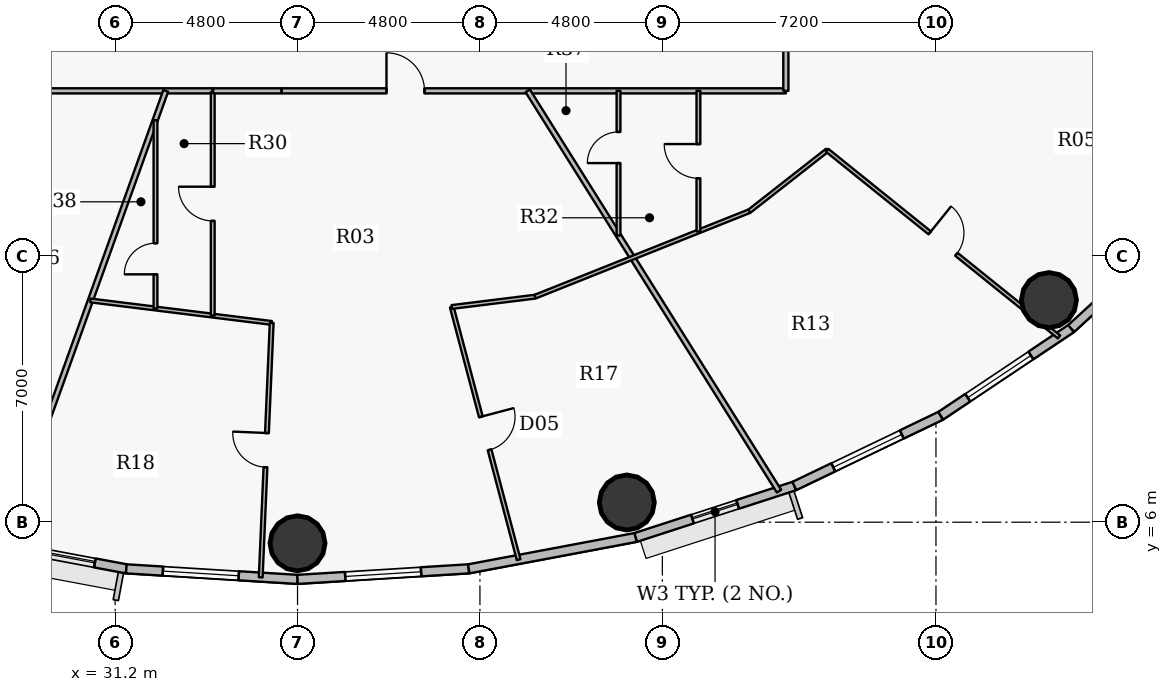
"""IFC4 building model, lengths in metres.
Left out: names, types, materials, properties, quantities, classifications, styles, units other than length and angle.
Written with IfcOpenShell. Run it as: python <this file> out.ifc"""

import sys

from ifc_helpers import new_model, si_unit, direction, frame, frame_2d, origin, origin_2d, place, context, subcontext, project, spatial, rectangle, hollow_circle, extrude, source, transform, mapped, element, fill, save


model = new_model("IFC4")
c1 = context("Model", 3, precision=1e-05, world=origin(), true_north=direction((0.0, 1.0)))
c2 = subcontext(c1, "Body", "Model", "MODEL_VIEW")
j1 = project(units=[si_unit("LENGTHUNIT", "METRE"), si_unit("PLANEANGLEUNIT", "RADIAN")], contexts=[c1])
p1 = place(None, origin())
s1 = spatial("IfcSite", under=j1, at=p1, CompositionType="ELEMENT")
p2 = place(p1, origin())
s2 = spatial("IfcBuilding", under=s1, at=p2, CompositionType="ELEMENT")
p3 = place(p2, frame((0.0, 0.0, 119.7)))
s3 = spatial("IfcBuildingStorey", under=s2, at=p3, CompositionType="ELEMENT", Elevation=119.7)
for number, where, z_axis, x_axis in (
    (1, (36.0, 5.445, 0.0), (0.0, 0.0, 1.0), (1.0, 0.0, 0.0)),
    (2, (44.666, 6.519, 0.0), (0.0, 0.0, 1.0), (1.0, 0.0, 0.0)),
    (3, (55.773, 11.844, 0.0), (0.0, 0.0, 1.0), (1.0, 0.0, 0.0)),
):
    element("IfcColumn", number, at=place(p3, frame(where, z_axis=z_axis, x_axis=x_axis)), inside=s3, PredefinedType="COLUMN", context=c2, shape_type="SweptSolid", body=[
        extrude(hollow_circle(Radius=0.725, WallThickness=0.042, at=origin_2d()), origin(), (0.0, 0.0, 1.0), 3.75),
    ])
p4 = place(p3, frame((31.494, 4.773, 0.0), z_axis=(0.0, 0.0, 1.0), x_axis=(-0.982789252177, 0.184730305596, 0.0)))
e4 = element("IfcWall", 4, at=p4, inside=s3, PredefinedType="SOLIDWALL", context=c2, shape_type="SweptSolid", body=[
    extrude(rectangle(XDim=4.471, YDim=0.24, at=frame_2d((2.235, 0.0))), origin(), (0.0, 0.0, 1.0), 3.5),
])
p5 = place(p4, frame((0.843, 0.0, 0.9)))
e5 = element("IfcOpeningElement", 5, at=p5, cuts=e4, PredefinedType="OPENING", context=c2, shape_type="SweptSolid", body=[
    extrude(rectangle(XDim=2.0, YDim=1.75, at=origin_2d()), frame((1.0, 0.13, 0.875), z_axis=(0.0, -1.0, 0.0), x_axis=(1.0, 0.0, 0.0)), (0.0, 0.0, 1.0), 0.26),
])
p6 = place(p3, frame((36.0, 4.495, 0.0), z_axis=(0.0, 0.0, 1.0), x_axis=(-0.998107531589, 0.061492726276, 0.0)))
e6 = element("IfcWall", 6, at=p6, inside=s3, PredefinedType="SOLIDWALL", context=c2, shape_type="SweptSolid", body=[
    extrude(rectangle(XDim=4.514, YDim=0.24, at=frame_2d((2.257, 0.0))), origin(), (0.0, 0.0, 1.0), 3.5),
])
p7 = place(p6, frame((1.55, 0.0, 0.9)))
e7 = element("IfcOpeningElement", 7, at=p7, cuts=e6, PredefinedType="OPENING", context=c2, shape_type="SweptSolid", body=[
    extrude(rectangle(XDim=2.0, YDim=1.75, at=origin_2d()), frame((1.0, 0.13, 0.875), z_axis=(0.0, -1.0, 0.0), x_axis=(1.0, 0.0, 0.0)), (0.0, 0.0, 1.0), 0.26),
])
p8 = place(p3, frame((40.506, 4.773, 0.0), z_axis=(0.0, 0.0, 1.0), x_axis=(-0.998107531589, -0.061492726276, 0.0)))
e8 = element("IfcWall", 8, at=p8, inside=s3, PredefinedType="SOLIDWALL", context=c2, shape_type="SweptSolid", body=[
    extrude(rectangle(XDim=4.514, YDim=0.24, at=frame_2d((2.257, 0.0))), origin(), (0.0, 0.0, 1.0), 3.5),
])
p9 = place(p8, frame((1.257, 0.0, 0.9)))
e9 = element("IfcOpeningElement", 9, at=p9, cuts=e8, PredefinedType="OPENING", context=c2, shape_type="SweptSolid", body=[
    extrude(rectangle(XDim=2.0, YDim=1.75, at=origin_2d()), frame((1.0, 0.13, 0.875), z_axis=(0.0, -1.0, 0.0), x_axis=(1.0, 0.0, 0.0)), (0.0, 0.0, 1.0), 0.26),
])
p10 = place(p3, frame((44.9, 5.599, 0.0), z_axis=(0.0, 0.0, 1.0), x_axis=(-0.982789252177, -0.184730305596, 0.0)))
e10 = element("IfcWall", 10, at=p10, inside=s3, PredefinedType="SOLIDWALL", context=c2, shape_type="SweptSolid", body=[
    extrude(rectangle(XDim=4.471, YDim=0.24, at=frame_2d((2.235, 0.0))), origin(), (0.0, 0.0, 1.0), 3.5),
])
p11 = place(p3, frame((49.074, 6.953, 0.0), z_axis=(0.0, 0.0, 1.0), x_axis=(-0.951211346073, -0.308540070495, 0.0)))
e11 = element("IfcWall", 11, at=p11, inside=s3, PredefinedType="SOLIDWALL", context=c2, shape_type="SweptSolid", body=[
    extrude(rectangle(XDim=4.388, YDim=0.24, at=frame_2d((2.194, 0.0))), origin(), (0.0, 0.0, 1.0), 3.5),
])
p12 = place(p11, frame((1.569, 0.0, 0.9)))
e12 = element("IfcOpeningElement", 12, at=p12, cuts=e11, PredefinedType="OPENING", context=c2, shape_type="SweptSolid", body=[
    extrude(rectangle(XDim=1.25, YDim=1.65, at=origin_2d()), frame((0.625, 0.13, 0.825), z_axis=(0.0, -1.0, 0.0), x_axis=(1.0, 0.0, 0.0)), (0.0, 0.0, 1.0), 0.26),
])
p13 = place(p3, frame((52.925, 8.801, 0.0), z_axis=(0.0, 0.0, 1.0), x_axis=(-0.901589935876, -0.432591709962, 0.0)))
e13 = element("IfcWall", 13, at=p13, inside=s3, PredefinedType="SOLIDWALL", context=c2, shape_type="SweptSolid", body=[
    extrude(rectangle(XDim=4.272, YDim=0.24, at=frame_2d((2.136, 0.0))), origin(), (0.0, 0.0, 1.0), 3.5),
])
p14 = place(p13, frame((1.136, 0.0, 0.9)))
e14 = element("IfcOpeningElement", 14, at=p14, cuts=e13, PredefinedType="OPENING", context=c2, shape_type="SweptSolid", body=[
    extrude(rectangle(XDim=2.0, YDim=1.75, at=origin_2d()), frame((1.0, 0.13, 0.875), z_axis=(0.0, -1.0, 0.0), x_axis=(1.0, 0.0, 0.0)), (0.0, 0.0, 1.0), 0.26),
])
p15 = place(p3, frame((56.358, 11.097, 0.0), z_axis=(0.0, 0.0, 1.0), x_axis=(-0.831221811447, -0.555940914284, 0.0)))
e15 = element("IfcWall", 15, at=p15, inside=s3, PredefinedType="SOLIDWALL", context=c2, shape_type="SweptSolid", body=[
    extrude(rectangle(XDim=4.13, YDim=0.24, at=frame_2d((2.065, 0.0))), origin(), (0.0, 0.0, 1.0), 3.5),
])
p16 = place(p15, frame((1.276, 0.0, 0.9)))
e16 = element("IfcOpeningElement", 16, at=p16, cuts=e15, PredefinedType="OPENING", context=c2, shape_type="SweptSolid", body=[
    extrude(rectangle(XDim=2.0, YDim=1.75, at=origin_2d()), frame((1.0, 0.13, 0.875), z_axis=(0.0, -1.0, 0.0), x_axis=(1.0, 0.0, 0.0)), (0.0, 0.0, 1.0), 0.26),
])
p17 = place(p3, frame((59.289, 13.783, 0.0), z_axis=(0.0, 0.0, 1.0), x_axis=(-0.737113356241, -0.675769117414, 0.0)))
e17 = element("IfcWall", 17, at=p17, inside=s3, PredefinedType="SOLIDWALL", context=c2, shape_type="SweptSolid", body=[
    extrude(rectangle(XDim=3.976, YDim=0.24, at=frame_2d((1.988, 0.0))), origin(), (0.0, 0.0, 1.0), 3.5),
])
p18 = place(p17, frame((1.363, 0.0, 0.9)))
e18 = element("IfcOpeningElement", 18, at=p18, cuts=e17, PredefinedType="OPENING", context=c2, shape_type="SweptSolid", body=[
    extrude(rectangle(XDim=1.25, YDim=1.65, at=origin_2d()), frame((0.625, 0.13, 0.825), z_axis=(0.0, -1.0, 0.0), x_axis=(1.0, 0.0, 0.0)), (0.0, 0.0, 1.0), 0.26),
])
p19 = place(p3, frame((23.15, 17.35, 0.0), z_axis=(0.0, 0.0, 1.0), x_axis=(1.0, 0.0, 0.0)))
e19 = element("IfcWall", 19, at=p19, inside=s3, PredefinedType="PARTITIONING", context=c2, shape_type="SweptSolid", body=[
    extrude(rectangle(XDim=10.619, YDim=0.135, at=frame_2d((5.31, 0.0))), origin(), (0.0, 0.0, 1.0), 2.935),
])
p20 = place(p19, frame((4.211, 0.0, 0.0)))
e20 = element("IfcOpeningElement", 20, at=p20, cuts=e19, PredefinedType="OPENING", context=c2, shape_type="SweptSolid", body=[
    extrude(rectangle(XDim=1.0, YDim=2.15, at=origin_2d()), frame((0.5, 0.078, 1.075), z_axis=(0.0, -1.0, 0.0), x_axis=(1.0, 0.0, 0.0)), (0.0, 0.0, 1.0), 0.155),
])
p21 = place(p3, frame((28.232, 5.381, 0.0), z_axis=(0.0, 0.0, 1.0), x_axis=(0.338158615332, 0.941089130145, 0.0)))
e21 = element("IfcWall", 21, at=p21, inside=s3, PredefinedType="PARTITIONING", context=c2, shape_type="SweptSolid", body=[
    extrude(rectangle(XDim=12.718, YDim=0.135, at=frame_2d((6.359, 0.0))), origin(), (0.0, 0.0, 1.0), 2.935),
])
p22 = place(p3, frame((30.551, 11.835, 0.0), z_axis=(0.0, 0.0, 1.0), x_axis=(0.992401646286, -0.123040531728, 0.0)))
e22 = element("IfcWall", 22, at=p22, inside=s3, PredefinedType="PARTITIONING", context=c2, shape_type="SweptSolid", body=[
    extrude(rectangle(XDim=4.806, YDim=0.1, at=frame_2d((2.403, 0.0))), origin(), (0.0, 0.0, 1.0), 3.5),
])
p23 = place(p3, frame((32.262, 11.623, 0.0), z_axis=(0.0, 0.0, 1.0), x_axis=(0.0, 1.0, 0.0)))
e23 = element("IfcWall", 23, at=p23, inside=s3, PredefinedType="PARTITIONING", context=c2, shape_type="SweptSolid", body=[
    extrude(rectangle(XDim=4.955, YDim=0.1, at=frame_2d((2.478, 0.0))), origin(), (0.0, 0.0, 1.0), 3.5),
])
p24 = place(p23, frame((0.899, 0.0, 0.0)))
e24 = element("IfcOpeningElement", 24, at=p24, cuts=e23, PredefinedType="OPENING", context=c2, shape_type="SweptSolid", body=[
    extrude(rectangle(XDim=0.82, YDim=2.1, at=origin_2d()), frame((0.41, 0.06, 1.05), z_axis=(0.0, -1.0, 0.0), x_axis=(1.0, 0.0, 0.0)), (0.0, 0.0, 1.0), 0.12),
])
p25 = place(p3, frame((33.769, 11.436, 0.0), z_axis=(0.0, 0.0, 1.0), x_axis=(0.0, 1.0, 0.0)))
e25 = element("IfcWall", 25, at=p25, inside=s3, PredefinedType="PARTITIONING", context=c2, shape_type="SweptSolid", body=[
    extrude(rectangle(XDim=5.884, YDim=0.1, at=frame_2d((2.942, 0.0))), origin(), (0.0, 0.0, 1.0), 3.5),
])
p26 = place(p25, frame((2.492, 0.0, 0.0)))
e26 = element("IfcOpeningElement", 26, at=p26, cuts=e25, PredefinedType="OPENING", context=c2, shape_type="SweptSolid", body=[
    extrude(rectangle(XDim=0.9, YDim=2.1, at=origin_2d()), frame((0.45, 0.06, 1.05), z_axis=(0.0, -1.0, 0.0), x_axis=(1.0, 0.0, 0.0)), (0.0, 0.0, 1.0), 0.12),
])
p27 = place(p3, frame((35.031, 4.55, 0.0), z_axis=(0.0, 0.0, 1.0), x_axis=(0.043108301027, 0.999070405118, 0.0)))
e27 = element("IfcWall", 27, at=p27, inside=s3, PredefinedType="PARTITIONING", context=c2, shape_type="SweptSolid", body=[
    extrude(rectangle(XDim=6.7, YDim=0.1, at=frame_2d((3.35, 0.0))), origin(), (0.0, 0.0, 1.0), 2.935),
])
p28 = place(p27, frame((2.9, 0.0, 0.0)))
e28 = element("IfcOpeningElement", 28, at=p28, cuts=e27, PredefinedType="OPENING", context=c2, shape_type="SweptSolid", body=[
    extrude(rectangle(XDim=0.9, YDim=2.1, at=origin_2d()), frame((0.45, 0.06, 1.05), z_axis=(0.0, -1.0, 0.0), x_axis=(1.0, 0.0, 0.0)), (0.0, 0.0, 1.0), 0.12),
])
p29 = place(p3, frame((35.584, 17.35, 0.0), z_axis=(0.0, 0.0, 1.0), x_axis=(1.0, 0.0, 0.0)))
e29 = element("IfcWall", 29, at=p29, inside=s3, PredefinedType="PARTITIONING", context=c2, shape_type="SweptSolid", body=[
    extrude(rectangle(XDim=13.266, YDim=0.135, at=frame_2d((6.633, 0.0))), origin(), (0.0, 0.0, 1.0), 2.935),
])
p30 = place(p29, frame((2.757, 0.0, 0.0)))
e30 = element("IfcOpeningElement", 30, at=p30, cuts=e29, PredefinedType="OPENING", context=c2, shape_type="SweptSolid", body=[
    extrude(rectangle(XDim=1.0, YDim=2.15, at=origin_2d()), frame((0.5, 0.078, 1.075), z_axis=(0.0, -1.0, 0.0), x_axis=(1.0, 0.0, 0.0)), (0.0, 0.0, 1.0), 0.155),
])
p31 = place(p3, frame((40.059, 11.662, 0.0), z_axis=(0.0, 0.0, 1.0), x_axis=(0.255861334688, -0.966713492929, 0.0)))
e31 = element("IfcWall", 31, at=p31, inside=s3, PredefinedType="PARTITIONING", context=c2, shape_type="SweptSolid", body=[
    extrude(rectangle(XDim=6.877, YDim=0.1, at=frame_2d((3.438, 0.0))), origin(), (0.0, 0.0, 1.0), 2.935),
])
p32 = place(p31, frame((2.988, 0.0, 0.0)))
e32 = element("IfcOpeningElement", 32, at=p32, cuts=e31, PredefinedType="OPENING", context=c2, shape_type="SweptSolid", body=[
    extrude(rectangle(XDim=0.9, YDim=2.1, at=origin_2d()), frame((0.45, 0.06, 1.05), z_axis=(0.0, -1.0, 0.0), x_axis=(1.0, 0.0, 0.0)), (0.0, 0.0, 1.0), 0.12),
])
p33 = place(p3, frame((40.059, 11.662, 0.0), z_axis=(0.0, 0.0, 1.0), x_axis=(0.992393057675, 0.12310978466, 0.0)))
e33 = element("IfcWall", 33, at=p33, inside=s3, PredefinedType="PARTITIONING", context=c2, shape_type="SweptSolid", body=[
    extrude(rectangle(XDim=2.209, YDim=0.1, at=frame_2d((1.104, 0.0))), origin(), (0.0, 0.0, 1.0), 2.935),
])
p34 = place(p3, frame((42.058, 17.35, 0.0), z_axis=(0.0, 0.0, 1.0), x_axis=(0.531660079213, -0.846957826678, 0.0)))
e34 = element("IfcWall", 34, at=p34, inside=s3, PredefinedType="PARTITIONING", context=c2, shape_type="SweptSolid", body=[
    extrude(rectangle(XDim=12.437, YDim=0.135, at=frame_2d((6.219, 0.0))), origin(), (0.0, 0.0, 1.0), 2.935),
])
p35 = place(p3, frame((42.251, 11.934, 0.0), z_axis=(0.0, 0.0, 1.0), x_axis=(0.928803554156, 0.370572473055, 0.0)))
e35 = element("IfcWall", 35, at=p35, inside=s3, PredefinedType="PARTITIONING", context=c2, shape_type="SweptSolid", body=[
    extrude(rectangle(XDim=6.072, YDim=0.1, at=frame_2d((3.036, 0.0))), origin(), (0.0, 0.0, 1.0), 2.935),
])
p36 = place(p3, frame((44.447, 13.544, 0.0), z_axis=(0.0, 0.0, 1.0), x_axis=(0.0, 1.0, 0.0)))
e36 = element("IfcWall", 36, at=p36, inside=s3, PredefinedType="PARTITIONING", context=c2, shape_type="SweptSolid", body=[
    extrude(rectangle(XDim=3.806, YDim=0.1, at=frame_2d((1.903, 0.0))), origin(), (0.0, 0.0, 1.0), 3.5),
])
p37 = place(p36, frame((1.905, 0.0, 0.0)))
e37 = element("IfcOpeningElement", 37, at=p37, cuts=e36, PredefinedType="OPENING", context=c2, shape_type="SweptSolid", body=[
    extrude(rectangle(XDim=0.82, YDim=2.1, at=origin_2d()), frame((0.41, 0.06, 1.05), z_axis=(0.0, -1.0, 0.0), x_axis=(1.0, 0.0, 0.0)), (0.0, 0.0, 1.0), 0.12),
])
p38 = place(p3, frame((46.549, 13.649, 0.0), z_axis=(0.0, 0.0, 1.0), x_axis=(0.0, 1.0, 0.0)))
e38 = element("IfcWall", 38, at=p38, inside=s3, PredefinedType="PARTITIONING", context=c2, shape_type="SweptSolid", body=[
    extrude(rectangle(XDim=3.701, YDim=0.1, at=frame_2d((1.851, 0.0))), origin(), (0.0, 0.0, 1.0), 3.5),
])
p39 = place(p38, frame((1.4, 0.0, 0.0)))
e39 = element("IfcOpeningElement", 39, at=p39, cuts=e38, PredefinedType="OPENING", context=c2, shape_type="SweptSolid", body=[
    extrude(rectangle(XDim=0.9, YDim=2.1, at=origin_2d()), frame((0.45, 0.06, 1.05), z_axis=(0.0, -1.0, 0.0), x_axis=(1.0, 0.0, 0.0)), (0.0, 0.0, 1.0), 0.12),
])
p40 = place(p3, frame((47.891, 14.184, 0.0), z_axis=(0.0, 0.0, 1.0), x_axis=(0.787364158956, 0.616488184146, 0.0)))
e40 = element("IfcWall", 40, at=p40, inside=s3, PredefinedType="PARTITIONING", context=c2, shape_type="SweptSolid", body=[
    extrude(rectangle(XDim=2.597, YDim=0.1, at=frame_2d((1.299, 0.0))), origin(), (0.0, 0.0, 1.0), 3.5),
])
p41 = place(p3, frame((48.85, 17.35, 0.0), z_axis=(0.0, 0.0, 1.0), x_axis=(0.0, 1.0, 0.0)))
e41 = element("IfcWall", 41, at=p41, inside=s3, PredefinedType="PARTITIONING", context=c2, shape_type="SweptSolid", body=[
    extrude(rectangle(XDim=19.3, YDim=0.135, at=frame_2d((9.65, 0.0))), origin(), (0.0, 0.0, 1.0), 2.935),
])
p42 = place(p41, frame((2.036, 0.0, 0.0)))
e42 = element("IfcOpeningElement", 42, at=p42, cuts=e41, PredefinedType="OPENING", context=c2, shape_type="SweptSolid", body=[
    extrude(rectangle(XDim=1.0, YDim=2.15, at=origin_2d()), frame((0.5, 0.078, 1.075), z_axis=(0.0, -1.0, 0.0), x_axis=(1.0, 0.0, 0.0)), (0.0, 0.0, 1.0), 0.155),
])
p43 = place(p41, frame((10.875, 0.0, 0.0)))
e43 = element("IfcOpeningElement", 43, at=p43, cuts=e41, PredefinedType="OPENING", context=c2, shape_type="SweptSolid", body=[
    extrude(rectangle(XDim=1.0, YDim=2.15, at=origin_2d()), frame((0.5, 0.078, 1.075), z_axis=(0.0, -1.0, 0.0), x_axis=(1.0, 0.0, 0.0)), (0.0, 0.0, 1.0), 0.155),
])
p44 = place(p3, frame((48.85, 22.383, 0.0), z_axis=(0.0, 0.0, 1.0), x_axis=(0.941089213164, -0.338158384292, 0.0)))
e44 = element("IfcWall", 44, at=p44, inside=s3, PredefinedType="PARTITIONING", context=c2, shape_type="SweptSolid", body=[
    extrude(rectangle(XDim=14.069, YDim=0.135, at=frame_2d((7.035, 0.0))), origin(), (0.0, 0.0, 1.0), 2.935),
])
p45 = place(p3, frame((49.936, 15.786, 0.0), z_axis=(0.0, 0.0, 1.0), x_axis=(0.779083359145, -0.626920345421, 0.0)))
e45 = element("IfcWall", 45, at=p45, inside=s3, PredefinedType="PARTITIONING", context=c2, shape_type="SweptSolid", body=[
    extrude(rectangle(XDim=7.831, YDim=0.1, at=frame_2d((3.916, 0.0))), origin(), (0.0, 0.0, 1.0), 2.935),
])
p46 = place(p45, frame((3.466, 0.0, 0.0)))
e46 = element("IfcOpeningElement", 46, at=p46, cuts=e45, PredefinedType="OPENING", context=c2, shape_type="SweptSolid", body=[
    extrude(rectangle(XDim=0.9, YDim=2.1, at=origin_2d()), frame((0.45, 0.06, 1.05), z_axis=(0.0, -1.0, 0.0), x_axis=(1.0, 0.0, 0.0)), (0.0, 0.0, 1.0), 0.12),
])
p47 = place(p3, frame((35.574, 17.35, 0.0), z_axis=(0.0, 0.0, 1.0), x_axis=(-1.0, 0.0, 0.0)))
e47 = element("IfcWall", 47, at=p47, inside=s3, PredefinedType="PARTITIONING", context=c2, shape_type="SweptSolid", body=[
    extrude(rectangle(XDim=1.795, YDim=0.135, at=frame_2d((0.897, 0.0))), origin(), (0.0, 0.0, 1.0), 3.5),
])
m1 = source(origin(), c2, "Body", "SweptSolid", [
    extrude(rectangle(XDim=2.0, YDim=1.75, at=origin_2d()), frame((1.0, 0.03, 0.875), z_axis=(0.0, -1.0, 0.0), x_axis=(1.0, 0.0, 0.0)), (0.0, 0.0, 1.0), 0.06),
])
p48 = place(p5, origin())
e48 = element("IfcWindow", 48, at=p48, inside=s3, PartitioningType="DOUBLE_PANEL_VERTICAL", PredefinedType="WINDOW", context=c2, shape_type="MappedRepresentation", body=[
    mapped(m1, transform((0.0, 0.0, 0.0), x_axis=(1.0, 0.0, 0.0), y_axis=(0.0, 1.0, 0.0), z_axis=(0.0, 0.0, 1.0), scale=1.0)),
])
fill(e5, e48)
p49 = place(p7, origin())
e49 = element("IfcWindow", 49, at=p49, inside=s3, PartitioningType="DOUBLE_PANEL_VERTICAL", PredefinedType="WINDOW", context=c2, shape_type="MappedRepresentation", body=[
    mapped(m1, transform((0.0, 0.0, 0.0), x_axis=(1.0, 0.0, 0.0), y_axis=(0.0, 1.0, 0.0), z_axis=(0.0, 0.0, 1.0), scale=1.0)),
])
fill(e7, e49)
p50 = place(p9, origin())
e50 = element("IfcWindow", 50, at=p50, inside=s3, PartitioningType="DOUBLE_PANEL_VERTICAL", PredefinedType="WINDOW", context=c2, shape_type="MappedRepresentation", body=[
    mapped(m1, transform((0.0, 0.0, 0.0), x_axis=(1.0, 0.0, 0.0), y_axis=(0.0, 1.0, 0.0), z_axis=(0.0, 0.0, 1.0), scale=1.0)),
])
fill(e9, e50)
p51 = place(p14, origin())
e51 = element("IfcWindow", 51, at=p51, inside=s3, PartitioningType="DOUBLE_PANEL_VERTICAL", PredefinedType="WINDOW", context=c2, shape_type="MappedRepresentation", body=[
    mapped(m1, transform((0.0, 0.0, 0.0), x_axis=(1.0, 0.0, 0.0), y_axis=(0.0, 1.0, 0.0), z_axis=(0.0, 0.0, 1.0), scale=1.0)),
])
fill(e14, e51)
p52 = place(p16, origin())
e52 = element("IfcWindow", 52, at=p52, inside=s3, PartitioningType="DOUBLE_PANEL_VERTICAL", PredefinedType="WINDOW", context=c2, shape_type="MappedRepresentation", body=[
    mapped(m1, transform((0.0, 0.0, 0.0), x_axis=(1.0, 0.0, 0.0), y_axis=(0.0, 1.0, 0.0), z_axis=(0.0, 0.0, 1.0), scale=1.0)),
])
fill(e16, e52)
m2 = source(origin(), c2, "Body", "SweptSolid", [
    extrude(rectangle(XDim=1.25, YDim=1.65, at=origin_2d()), frame((0.625, 0.03, 0.825), z_axis=(0.0, -1.0, 0.0), x_axis=(1.0, 0.0, 0.0)), (0.0, 0.0, 1.0), 0.06),
])
p53 = place(p12, origin())
e53 = element("IfcWindow", 53, at=p53, inside=s3, PartitioningType="SINGLE_PANEL", PredefinedType="WINDOW", context=c2, shape_type="MappedRepresentation", body=[
    mapped(m2, transform((0.0, 0.0, 0.0), x_axis=(1.0, 0.0, 0.0), y_axis=(0.0, 1.0, 0.0), z_axis=(0.0, 0.0, 1.0), scale=1.0)),
])
fill(e12, e53)
m3 = source(origin(), c2, "Body", "SweptSolid", [
    extrude(rectangle(XDim=1.0, YDim=2.15, at=origin_2d()), frame((0.5, 0.025, 1.075), z_axis=(0.0, -1.0, 0.0), x_axis=(1.0, 0.0, 0.0)), (0.0, 0.0, 1.0), 0.05),
])
p54 = place(p30, origin())
e54 = element("IfcDoor", 54, at=p54, inside=s3, OperationType="SINGLE_SWING_LEFT", PredefinedType="DOOR", context=c2, shape_type="MappedRepresentation", body=[
    mapped(m3, transform((0.0, 0.0, 0.0), x_axis=(1.0, 0.0, 0.0), y_axis=(0.0, 1.0, 0.0), z_axis=(0.0, 0.0, 1.0), scale=1.0)),
])
fill(e30, e54)
m4 = source(origin(), c2, "Body", "SweptSolid", [
    extrude(rectangle(XDim=0.9, YDim=2.1, at=origin_2d()), frame((0.45, 0.025, 1.05), z_axis=(0.0, -1.0, 0.0), x_axis=(1.0, 0.0, 0.0)), (0.0, 0.0, 1.0), 0.05),
])
p55 = place(p28, origin())
e55 = element("IfcDoor", 55, at=p55, inside=s3, OperationType="SINGLE_SWING_RIGHT", PredefinedType="DOOR", context=c2, shape_type="MappedRepresentation", body=[
    mapped(m4, transform((0.0, 0.0, 0.0), x_axis=(1.0, 0.0, 0.0), y_axis=(0.0, 1.0, 0.0), z_axis=(0.0, 0.0, 1.0), scale=1.0)),
])
fill(e28, e55)
p56 = place(p32, origin())
e56 = element("IfcDoor", 56, at=p56, inside=s3, OperationType="SINGLE_SWING_LEFT", PredefinedType="DOOR", context=c2, shape_type="MappedRepresentation", body=[
    mapped(m4, transform((0.0, 0.0, 0.0), x_axis=(1.0, 0.0, 0.0), y_axis=(0.0, 1.0, 0.0), z_axis=(0.0, 0.0, 1.0), scale=1.0)),
])
fill(e32, e56)
p57 = place(p26, origin())
e57 = element("IfcDoor", 57, at=p57, inside=s3, OperationType="SINGLE_SWING_RIGHT", PredefinedType="DOOR", context=c2, shape_type="MappedRepresentation", body=[
    mapped(m4, transform((0.0, 0.0, 0.0), x_axis=(1.0, 0.0, 0.0), y_axis=(0.0, 1.0, 0.0), z_axis=(0.0, 0.0, 1.0), scale=1.0)),
])
fill(e26, e57)
m5 = source(origin(), c2, "Body", "SweptSolid", [
    extrude(rectangle(XDim=0.82, YDim=2.1, at=origin_2d()), frame((0.41, 0.025, 1.05), z_axis=(0.0, -1.0, 0.0), x_axis=(1.0, 0.0, 0.0)), (0.0, 0.0, 1.0), 0.05),
])
p58 = place(p24, origin())
e58 = element("IfcDoor", 58, at=p58, inside=s3, OperationType="SINGLE_SWING_LEFT", PredefinedType="DOOR", context=c2, shape_type="MappedRepresentation", body=[
    mapped(m5, transform((0.0, 0.0, 0.0), x_axis=(1.0, 0.0, 0.0), y_axis=(0.0, 1.0, 0.0), z_axis=(0.0, 0.0, 1.0), scale=1.0)),
])
fill(e24, e58)
p59 = place(p46, origin())
e59 = element("IfcDoor", 59, at=p59, inside=s3, OperationType="SINGLE_SWING_LEFT", PredefinedType="DOOR", context=c2, shape_type="MappedRepresentation", body=[
    mapped(m4, transform((0.0, 0.0, 0.0), x_axis=(1.0, 0.0, 0.0), y_axis=(0.0, 1.0, 0.0), z_axis=(0.0, 0.0, 1.0), scale=1.0)),
])
fill(e46, e59)
p60 = place(p39, origin())
e60 = element("IfcDoor", 60, at=p60, inside=s3, OperationType="SINGLE_SWING_RIGHT", PredefinedType="DOOR", context=c2, shape_type="MappedRepresentation", body=[
    mapped(m4, transform((0.0, 0.0, 0.0), x_axis=(1.0, 0.0, 0.0), y_axis=(0.0, 1.0, 0.0), z_axis=(0.0, 0.0, 1.0), scale=1.0)),
])
fill(e39, e60)
p61 = place(p37, origin())
e61 = element("IfcDoor", 61, at=p61, inside=s3, OperationType="SINGLE_SWING_LEFT", PredefinedType="DOOR", context=c2, shape_type="MappedRepresentation", body=[
    mapped(m5, transform((0.0, 0.0, 0.0), x_axis=(1.0, 0.0, 0.0), y_axis=(0.0, 1.0, 0.0), z_axis=(0.0, 0.0, 1.0), scale=1.0)),
])
fill(e37, e61)
save(model, sys.argv[1])
